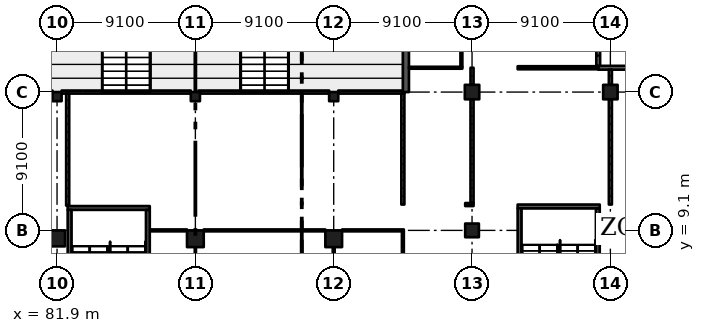
"""IFC4 building model, lengths in metres.
Left out: names, types, materials, properties, quantities, classifications, styles, units other than length and angle.
Written with IfcOpenShell. Run it as: python <this file> out.ifc"""

import sys

from ifc_helpers import new_model, si_unit, direction, frame, frame_2d, origin, origin_2d, place, context, subcontext, project, spatial, rectangle, extrude, element, fill, save


model = new_model("IFC4")
c1 = context("Model", 3, precision=1e-05, world=origin(), true_north=direction((0.0, 1.0)))
c2 = subcontext(c1, "Body", "Model", "MODEL_VIEW")
j1 = project(units=[si_unit("LENGTHUNIT", "METRE"), si_unit("PLANEANGLEUNIT", "RADIAN")], contexts=[c1])
p1 = place(None, origin())
s1 = spatial("IfcSite", under=j1, at=p1, CompositionType="ELEMENT")
p2 = place(p1, origin())
s2 = spatial("IfcBuilding", under=s1, at=p2, CompositionType="ELEMENT")
p3 = place(p2, origin())
s3 = spatial("IfcBuildingStorey", under=s2, at=p3, CompositionType="ELEMENT", Elevation=0.0)
p4 = place(p3, frame((81.9, 8.575, -0.4), z_axis=(0.0, 0.0, 1.0), x_axis=(1.0, 0.0, 0.0)))
e1 = element("IfcColumn", 1, at=p4, inside=s3, PredefinedType="COLUMN", context=c2, shape_type="SweptSolid", body=[
    extrude(rectangle(XDim=1.05, YDim=1.05, at=origin_2d()), origin(), (0.0, 0.0, 1.0), 6.77),
])
p5 = place(p3, frame((81.9, 17.9, -0.4), z_axis=(0.0, 0.0, 1.0), x_axis=(1.0, 0.0, 0.0)))
e2 = element("IfcColumn", 2, at=p5, inside=s3, PredefinedType="COLUMN", context=c2, shape_type="SweptSolid", body=[
    extrude(rectangle(XDim=0.6, YDim=0.6, at=origin_2d()), origin(), (0.0, 0.0, 1.0), 6.77),
])
p6 = place(p3, frame((91.0, 8.55, -0.4), z_axis=(0.0, 0.0, 1.0), x_axis=(1.0, 0.0, 0.0)))
e3 = element("IfcColumn", 3, at=p6, inside=s3, PredefinedType="COLUMN", context=c2, shape_type="SweptSolid", body=[
    extrude(rectangle(XDim=1.1, YDim=1.1, at=origin_2d()), origin(), (0.0, 0.0, 1.0), 6.77),
])
p7 = place(p3, frame((91.0, 17.9, -0.4), z_axis=(0.0, 0.0, 1.0), x_axis=(1.0, 0.0, 0.0)))
e4 = element("IfcColumn", 4, at=p7, inside=s3, PredefinedType="COLUMN", context=c2, shape_type="SweptSolid", body=[
    extrude(rectangle(XDim=0.6, YDim=0.6, at=origin_2d()), origin(), (0.0, 0.0, 1.0), 6.77),
])
p8 = place(p3, frame((100.1, 8.55, -0.4), z_axis=(0.0, 0.0, 1.0), x_axis=(1.0, 0.0, 0.0)))
e5 = element("IfcColumn", 5, at=p8, inside=s3, PredefinedType="COLUMN", context=c2, shape_type="SweptSolid", body=[
    extrude(rectangle(XDim=1.1, YDim=1.1, at=origin_2d()), origin(), (0.0, 0.0, 1.0), 6.77),
])
p9 = place(p3, frame((100.1, 17.9, -0.4), z_axis=(0.0, 0.0, 1.0), x_axis=(1.0, 0.0, 0.0)))
e6 = element("IfcColumn", 6, at=p9, inside=s3, PredefinedType="COLUMN", context=c2, shape_type="SweptSolid", body=[
    extrude(rectangle(XDim=0.6, YDim=0.6, at=origin_2d()), origin(), (0.0, 0.0, 1.0), 6.77),
])
p10 = place(p3, frame((109.2, 9.1, -0.4), z_axis=(0.0, 0.0, 1.0), x_axis=(1.0, 0.0, 0.0)))
e7 = element("IfcColumn", 7, at=p10, inside=s3, PredefinedType="COLUMN", context=c2, shape_type="SweptSolid", body=[
    extrude(rectangle(XDim=0.9, YDim=0.9, at=origin_2d()), origin(), (0.0, 0.0, 1.0), 6.77),
])
p11 = place(p3, frame((109.2, 18.2, -0.4), z_axis=(0.0, 0.0, 1.0), x_axis=(1.0, 0.0, 0.0)))
e8 = element("IfcColumn", 8, at=p11, inside=s3, PredefinedType="COLUMN", context=c2, shape_type="SweptSolid", body=[
    extrude(rectangle(XDim=0.95, YDim=0.95, at=origin_2d()), origin(), (0.0, 0.0, 1.0), 6.77),
])
p12 = place(p3, frame((118.3, 9.1, -0.4), z_axis=(0.0, 0.0, 1.0), x_axis=(1.0, 0.0, 0.0)))
e9 = element("IfcColumn", 9, at=p12, inside=s3, PredefinedType="COLUMN", context=c2, shape_type="SweptSolid", body=[
    extrude(rectangle(XDim=0.8, YDim=0.8, at=origin_2d()), origin(), (0.0, 0.0, 1.0), 6.77),
])
p13 = place(p3, frame((118.3, 18.2, -0.4), z_axis=(0.0, 0.0, 1.0), x_axis=(1.0, 0.0, 0.0)))
e10 = element("IfcColumn", 10, at=p13, inside=s3, PredefinedType="COLUMN", context=c2, shape_type="SweptSolid", body=[
    extrude(rectangle(XDim=0.95, YDim=0.95, at=origin_2d()), origin(), (0.0, 0.0, 1.0), 6.77),
])
p14 = place(p3, frame((104.85, 36.4, -0.4), z_axis=(0.0, 0.0, 1.0), x_axis=(0.0, -1.0, 0.0)))
e11 = element("IfcWall", 11, at=p14, inside=s3, PredefinedType="SHEAR", context=c2, shape_type="SweptSolid", body=[
    extrude(rectangle(XDim=18.2, YDim=0.4, at=frame_2d((9.1, 0.0))), origin(), (0.0, 0.0, 1.0), 6.77),
])
p15 = place(p3, frame((117.6, 10.675, -0.4), z_axis=(0.0, 0.0, 1.0), x_axis=(-1.0, 0.0, 0.0)))
e12 = element("IfcWall", 12, at=p15, inside=s3, PredefinedType="SHEAR", context=c2, shape_type="SweptSolid", body=[
    extrude(rectangle(XDim=5.4, YDim=0.25, at=frame_2d((2.7, 0.0))), origin(), (0.0, 0.0, 1.0), 6.77),
])
p16 = place(p15, frame((1.5, 0.0, 0.4)))
e13 = element("IfcOpeningElement", 13, at=p16, cuts=e12, PredefinedType="OPENING", context=c2, shape_type="SweptSolid", body=[
    extrude(rectangle(XDim=2.4, YDim=2.1, at=frame_2d((1.2, 1.05))), frame((0.0, 0.135, 0.0), z_axis=(0.0, -1.0, 0.0), x_axis=(1.0, 0.0, 0.0)), (0.0, 0.0, 1.0), 0.27),
])
p17 = place(p3, frame((112.325, 10.55, -0.4), z_axis=(0.0, 0.0, 1.0), x_axis=(0.0, -1.0, 0.0)))
e14 = element("IfcWall", 14, at=p17, inside=s3, PredefinedType="SHEAR", context=c2, shape_type="SweptSolid", body=[
    extrude(rectangle(XDim=9.6, YDim=0.25, at=frame_2d((4.8, 0.0))), origin(), (0.0, 0.0, 1.0), 6.77),
])
p18 = place(p17, frame((0.45, 0.0, 0.4)))
e15 = element("IfcOpeningElement", 15, at=p18, cuts=e14, PredefinedType="OPENING", context=c2, shape_type="SweptSolid", body=[
    extrude(rectangle(XDim=1.2, YDim=2.1, at=frame_2d((0.6, 1.05))), frame((0.0, 0.135, 0.0), z_axis=(0.0, -1.0, 0.0), x_axis=(1.0, 0.0, 0.0)), (0.0, 0.0, 1.0), 0.27),
])
p19 = place(p3, frame((117.475, 10.55, -0.4), z_axis=(0.0, 0.0, 1.0), x_axis=(0.0, -1.0, 0.0)))
e16 = element("IfcWall", 16, at=p19, inside=s3, PredefinedType="SHEAR", context=c2, shape_type="SweptSolid", body=[
    extrude(rectangle(XDim=9.6, YDim=0.25, at=frame_2d((4.8, 0.0))), origin(), (0.0, 0.0, 1.0), 6.77),
])
p20 = place(p3, frame((88.0, 10.575, -0.4), z_axis=(0.0, 0.0, 1.0), x_axis=(-1.0, 0.0, 0.0)))
e17 = element("IfcWall", 17, at=p20, inside=s3, PredefinedType="SHEAR", context=c2, shape_type="SweptSolid", body=[
    extrude(rectangle(XDim=5.4, YDim=0.25, at=frame_2d((2.7, 0.0))), origin(), (0.0, 0.0, 1.0), 6.77),
])
p21 = place(p20, frame((1.5, 0.0, 0.4)))
e18 = element("IfcOpeningElement", 18, at=p21, cuts=e17, PredefinedType="OPENING", context=c2, shape_type="SweptSolid", body=[
    extrude(rectangle(XDim=2.4, YDim=2.1, at=frame_2d((1.2, 1.05))), frame((0.0, 0.135, 0.0), z_axis=(0.0, -1.0, 0.0), x_axis=(1.0, 0.0, 0.0)), (0.0, 0.0, 1.0), 0.27),
])
for number, where, z_axis, x_axis in (
    (19, (82.725, 10.45, -0.4), (0.0, 0.0, 1.0), (0.0, -1.0, 0.0)),
    (20, (87.875, 10.45, -0.4), (0.0, 0.0, 1.0), (0.0, -1.0, 0.0)),
):
    element("IfcWall", number, at=place(p3, frame(where, z_axis=z_axis, x_axis=x_axis)), inside=s3, PredefinedType="SHEAR", context=c2, shape_type="SweptSolid", body=[
        extrude(rectangle(XDim=9.6, YDim=0.25, at=frame_2d((4.8, 0.0))), origin(), (0.0, 0.0, 1.0), 6.77),
    ])
p22 = place(p3, frame((82.2, 18.2, 0.0), z_axis=(0.0, 0.0, 1.0), x_axis=(1.0, 0.0, 0.0)))
e21 = element("IfcWall", 21, at=p22, inside=s3, PredefinedType="PARTITIONING", context=c2, shape_type="SweptSolid", body=[
    extrude(rectangle(XDim=8.5, YDim=0.2, at=frame_2d((4.25, 0.0))), origin(), (0.0, 0.0, 1.0), 5.02),
])
p23 = place(p3, frame((82.6, 18.1, 0.0), z_axis=(0.0, 0.0, 1.0), x_axis=(0.0, -1.0, 0.0)))
e22 = element("IfcWall", 22, at=p23, inside=s3, PredefinedType="PARTITIONING", context=c2, shape_type="SweptSolid", body=[
    extrude(rectangle(XDim=7.37, YDim=0.2, at=frame_2d((3.685, 0.0))), origin(), (0.0, 0.0, 1.0), 6.02),
])
p24 = place(p23, frame((2.15, 0.0, 0.0)))
e23 = element("IfcOpeningElement", 23, at=p24, cuts=e22, PredefinedType="OPENING", context=c2, shape_type="SweptSolid", body=[
    extrude(rectangle(XDim=3.0, YDim=2.4, at=frame_2d((1.5, 1.2))), frame((0.0, 0.11, 0.0), z_axis=(0.0, -1.0, 0.0), x_axis=(1.0, 0.0, 0.0)), (0.0, 0.0, 1.0), 0.22),
])
p25 = place(p3, frame((90.45, 9.1, 0.0), z_axis=(0.0, 0.0, 1.0), x_axis=(-1.0, 0.0, 0.0)))
e24 = element("IfcWall", 24, at=p25, inside=s3, PredefinedType="PARTITIONING", context=c2, shape_type="SweptSolid", body=[
    extrude(rectangle(XDim=2.42, YDim=0.125, at=frame_2d((1.21, 0.0))), origin(), (0.0, 0.0, 1.0), 5.57),
])
p26 = place(p3, frame((91.2, 18.2, 0.0), z_axis=(0.0, 0.0, 1.0), x_axis=(1.0, 0.0, 0.0)))
e25 = element("IfcWall", 25, at=p26, inside=s3, PredefinedType="PARTITIONING", context=c2, shape_type="SweptSolid", body=[
    extrude(rectangle(XDim=8.6, YDim=0.2, at=frame_2d((4.3, 0.0))), origin(), (0.0, 0.0, 1.0), 5.02),
])
p27 = place(p3, frame((99.55, 9.1, 0.0), z_axis=(0.0, 0.0, 1.0), x_axis=(-1.0, 0.0, 0.0)))
e26 = element("IfcWall", 26, at=p27, inside=s3, PredefinedType="PARTITIONING", context=c2, shape_type="SweptSolid", body=[
    extrude(rectangle(XDim=8.0, YDim=0.125, at=frame_2d((4.0, 0.0))), origin(), (0.0, 0.0, 1.0), 5.32),
])
p28 = place(p27, frame((3.55, 0.0, 0.0)))
e27 = element("IfcOpeningElement", 27, at=p28, cuts=e26, PredefinedType="OPENING", context=c2, shape_type="SweptSolid", body=[
    extrude(rectangle(XDim=0.9, YDim=2.1, at=frame_2d((0.45, 1.05))), frame((0.0, 0.073, 0.0), z_axis=(0.0, -1.0, 0.0), x_axis=(1.0, 0.0, 0.0)), (0.0, 0.0, 1.0), 0.145),
])
p29 = place(p3, frame((100.1, 8.0, 0.0), z_axis=(0.0, 0.0, 1.0), x_axis=(0.0, -1.0, 0.0)))
e28 = element("IfcWall", 28, at=p29, inside=s3, PredefinedType="PARTITIONING", context=c2, shape_type="SweptSolid", body=[
    extrude(rectangle(XDim=7.65, YDim=0.125, at=frame_2d((3.825, 0.0))), origin(), (0.0, 0.0, 1.0), 5.37),
])
p30 = place(p3, frame((100.4, 18.2, 0.0), z_axis=(0.0, 0.0, 1.0), x_axis=(1.0, 0.0, 0.0)))
e29 = element("IfcWall", 29, at=p30, inside=s3, PredefinedType="PARTITIONING", context=c2, shape_type="SweptSolid", body=[
    extrude(rectangle(XDim=4.35, YDim=0.2, at=frame_2d((2.175, 0.0))), origin(), (0.0, 0.0, 1.0), 5.02),
])
p31 = place(p3, frame((104.65, 0.15, 0.0), z_axis=(0.0, 0.0, 1.0), x_axis=(0.0, 1.0, 0.0)))
e30 = element("IfcWall", 30, at=p31, inside=s3, PredefinedType="PARTITIONING", context=c2, shape_type="SweptSolid", body=[
    extrude(rectangle(XDim=8.888, YDim=0.125, at=frame_2d((4.444, 0.0))), origin(), (0.0, 0.0, 1.0), 6.02),
])
p32 = place(p3, frame((104.65, 10.8, 0.0), z_axis=(0.0, 0.0, 1.0), x_axis=(0.0, 1.0, 0.0)))
e31 = element("IfcWall", 31, at=p32, inside=s3, PredefinedType="PARTITIONING", context=c2, shape_type="SweptSolid", body=[
    extrude(rectangle(XDim=7.3, YDim=0.2, at=frame_2d((3.65, 0.0))), origin(), (0.0, 0.0, 1.0), 6.02),
])
p33 = place(p32, frame((0.95, 0.0, 0.0)))
e32 = element("IfcOpeningElement", 32, at=p33, cuts=e31, PredefinedType="OPENING", context=c2, shape_type="SweptSolid", body=[
    extrude(rectangle(XDim=1.8, YDim=2.4, at=frame_2d((0.9, 1.2))), frame((0.0, 0.11, 0.0), z_axis=(0.0, -1.0, 0.0), x_axis=(1.0, 0.0, 0.0)), (0.0, 0.0, 1.0), 0.22),
])
p34 = place(p32, frame((4.55, 0.0, 0.0)))
e33 = element("IfcOpeningElement", 33, at=p34, cuts=e31, PredefinedType="OPENING", context=c2, shape_type="SweptSolid", body=[
    extrude(rectangle(XDim=1.8, YDim=2.4, at=frame_2d((0.9, 1.2))), frame((0.0, 0.11, 0.0), z_axis=(0.0, -1.0, 0.0), x_axis=(1.0, 0.0, 0.0)), (0.0, 0.0, 1.0), 0.22),
])
p35 = place(p3, frame((104.712, 9.1, 0.0), z_axis=(0.0, 0.0, 1.0), x_axis=(-1.0, 0.0, 0.0)))
e34 = element("IfcWall", 34, at=p35, inside=s3, PredefinedType="PARTITIONING", context=c2, shape_type="SweptSolid", body=[
    extrude(rectangle(XDim=4.062, YDim=0.125, at=frame_2d((2.031, 0.0))), origin(), (0.0, 0.0, 1.0), 5.32),
])
p36 = place(p35, frame((1.55, 0.0, 0.0)))
e35 = element("IfcOpeningElement", 35, at=p36, cuts=e34, PredefinedType="OPENING", context=c2, shape_type="SweptSolid", body=[
    extrude(rectangle(XDim=1.0, YDim=2.1, at=frame_2d((0.5, 1.05))), frame((0.0, 0.073, 0.0), z_axis=(0.0, -1.0, 0.0), x_axis=(1.0, 0.0, 0.0)), (0.0, 0.0, 1.0), 0.145),
])
p37 = place(p3, frame((105.05, 19.8, 0.0), z_axis=(0.0, 0.0, 1.0), x_axis=(1.0, 0.0, 0.0)))
e36 = element("IfcWall", 36, at=p37, inside=s3, PredefinedType="PARTITIONING", context=c2, shape_type="SweptSolid", body=[
    extrude(rectangle(XDim=3.512, YDim=0.125, at=frame_2d((1.756, 0.0))), origin(), (0.0, 0.0, 1.0), 6.02),
])
p38 = place(p37, frame((1.35, 0.0, 0.0)))
e37 = element("IfcOpeningElement", 37, at=p38, cuts=e36, PredefinedType="OPENING", context=c2, shape_type="SweptSolid", body=[
    extrude(rectangle(XDim=0.9, YDim=2.1, at=frame_2d((0.45, 1.05))), frame((0.0, 0.073, 0.0), z_axis=(0.0, -1.0, 0.0), x_axis=(1.0, 0.0, 0.0)), (0.0, 0.0, 1.0), 0.145),
])
p39 = place(p3, frame((108.5, 19.863, 0.0), z_axis=(0.0, 0.0, 1.0), x_axis=(0.0, 1.0, 0.0)))
e38 = element("IfcWall", 38, at=p39, inside=s3, PredefinedType="PARTITIONING", context=c2, shape_type="SweptSolid", body=[
    extrude(rectangle(XDim=7.012, YDim=0.125, at=frame_2d((3.506, 0.0))), origin(), (0.0, 0.0, 1.0), 6.02),
])
p40 = place(p3, frame((108.75, 10.8, 0.0), z_axis=(0.0, 0.0, 1.0), x_axis=(1.0, 0.0, 0.0)))
e39 = element("IfcWall", 39, at=p40, inside=s3, PredefinedType="PARTITIONING", context=c2, shape_type="SweptSolid", body=[
    extrude(rectangle(XDim=0.55, YDim=0.2, at=frame_2d((0.275, 0.0))), origin(), (0.0, 0.0, 1.0), 6.02),
])
p41 = place(p3, frame((109.2, 10.9, 0.0), z_axis=(0.0, 0.0, 1.0), x_axis=(0.0, 1.0, 0.0)))
e40 = element("IfcWall", 40, at=p41, inside=s3, PredefinedType="PARTITIONING", context=c2, shape_type="SweptSolid", body=[
    extrude(rectangle(XDim=6.825, YDim=0.2, at=frame_2d((3.413, 0.0))), origin(), (0.0, 0.0, 1.0), 5.32),
])
p42 = place(p41, frame((0.85, 0.0, 0.0)))
e41 = element("IfcOpeningElement", 41, at=p42, cuts=e40, PredefinedType="OPENING", context=c2, shape_type="SweptSolid", body=[
    extrude(rectangle(XDim=1.8, YDim=2.4, at=frame_2d((0.9, 1.2))), frame((0.0, 0.11, 0.0), z_axis=(0.0, -1.0, 0.0), x_axis=(1.0, 0.0, 0.0)), (0.0, 0.0, 1.0), 0.22),
])
p43 = place(p41, frame((4.25, 0.0, 0.0)))
e42 = element("IfcOpeningElement", 42, at=p43, cuts=e40, PredefinedType="OPENING", context=c2, shape_type="SweptSolid", body=[
    extrude(rectangle(XDim=1.8, YDim=2.4, at=frame_2d((0.9, 1.2))), frame((0.0, 0.11, 0.0), z_axis=(0.0, -1.0, 0.0), x_axis=(1.0, 0.0, 0.0)), (0.0, 0.0, 1.0), 0.22),
])
p44 = place(p3, frame((109.2, 18.675, 0.0), z_axis=(0.0, 0.0, 1.0), x_axis=(0.0, 1.0, 0.0)))
e43 = element("IfcWall", 43, at=p44, inside=s3, PredefinedType="PARTITIONING", context=c2, shape_type="SweptSolid", body=[
    extrude(rectangle(XDim=1.125, YDim=0.2, at=frame_2d((0.562, 0.0))), origin(), (0.0, 0.0, 1.0), 5.32),
])
p45 = place(p3, frame((112.2, 19.8, 0.0), z_axis=(0.0, 0.0, 1.0), x_axis=(1.0, 0.0, 0.0)))
e44 = element("IfcWall", 44, at=p45, inside=s3, PredefinedType="PARTITIONING", context=c2, shape_type="SweptSolid", body=[
    extrude(rectangle(XDim=5.3, YDim=0.2, at=frame_2d((2.65, 0.0))), origin(), (0.0, 0.0, 1.0), 6.02),
])
p46 = place(p45, frame((1.75, 0.0, 0.0)))
e45 = element("IfcOpeningElement", 45, at=p46, cuts=e44, PredefinedType="OPENING", context=c2, shape_type="SweptSolid", body=[
    extrude(rectangle(XDim=1.8, YDim=2.4, at=frame_2d((0.9, 1.2))), frame((0.0, 0.11, 0.0), z_axis=(0.0, -1.0, 0.0), x_axis=(1.0, 0.0, 0.0)), (0.0, 0.0, 1.0), 0.22),
])
p47 = place(p3, frame((117.5, 19.8, 0.0), z_axis=(0.0, 0.0, 1.0), x_axis=(1.0, 0.0, 0.0)))
e46 = element("IfcWall", 46, at=p47, inside=s3, PredefinedType="SOLIDWALL", context=c2, shape_type="SweptSolid", body=[
    extrude(rectangle(XDim=3.8, YDim=0.25, at=frame_2d((1.9, 0.0))), origin(), (0.0, 0.0, 1.0), 6.02),
])
p48 = place(p47, frame((1.85, 0.0, 0.0)))
e47 = element("IfcOpeningElement", 47, at=p48, cuts=e46, PredefinedType="OPENING", context=c2, shape_type="SweptSolid", body=[
    extrude(rectangle(XDim=1.0, YDim=2.1, at=frame_2d((0.5, 1.05))), frame((0.0, 0.135, 0.0), z_axis=(0.0, -1.0, 0.0), x_axis=(1.0, 0.0, 0.0)), (0.0, 0.0, 1.0), 0.27),
])
p49 = place(p3, frame((117.5, 19.925, 0.0), z_axis=(0.0, 0.0, 1.0), x_axis=(0.0, 1.0, 0.0)))
e48 = element("IfcWall", 48, at=p49, inside=s3, PredefinedType="SOLIDWALL", context=c2, shape_type="SweptSolid", body=[
    extrude(rectangle(XDim=2.845, YDim=0.25, at=frame_2d((1.422, 0.0))), origin(), (0.0, 0.0, 1.0), 6.02),
])
p50 = place(p3, frame((118.3, 10.8, 0.0), z_axis=(0.0, 0.0, 1.0), x_axis=(0.0, 1.0, 0.0)))
e49 = element("IfcWall", 49, at=p50, inside=s3, PredefinedType="PARTITIONING", context=c2, shape_type="SweptSolid", body=[
    extrude(rectangle(XDim=6.925, YDim=0.2, at=frame_2d((3.462, 0.0))), origin(), (0.0, 0.0, 1.0), 5.32),
])
p51 = place(p50, frame((0.85, 0.0, 0.0)))
e50 = element("IfcOpeningElement", 50, at=p51, cuts=e49, PredefinedType="OPENING", context=c2, shape_type="SweptSolid", body=[
    extrude(rectangle(XDim=1.8, YDim=2.4, at=frame_2d((0.9, 1.2))), frame((0.0, 0.11, 0.0), z_axis=(0.0, -1.0, 0.0), x_axis=(1.0, 0.0, 0.0)), (0.0, 0.0, 1.0), 0.22),
])
p52 = place(p50, frame((4.25, 0.0, 0.0)))
e51 = element("IfcOpeningElement", 51, at=p52, cuts=e49, PredefinedType="OPENING", context=c2, shape_type="SweptSolid", body=[
    extrude(rectangle(XDim=1.8, YDim=2.4, at=frame_2d((0.9, 1.2))), frame((0.0, 0.11, 0.0), z_axis=(0.0, -1.0, 0.0), x_axis=(1.0, 0.0, 0.0)), (0.0, 0.0, 1.0), 0.22),
])
p53 = place(p3, frame((118.3, 18.675, 0.0), z_axis=(0.0, 0.0, 1.0), x_axis=(0.0, 1.0, 0.0)))
e52 = element("IfcWall", 52, at=p53, inside=s3, PredefinedType="PARTITIONING", context=c2, shape_type="SweptSolid", body=[
    extrude(rectangle(XDim=1.0, YDim=0.2, at=frame_2d((0.5, 0.0))), origin(), (0.0, 0.0, 1.0), 5.32),
])
p54 = place(p38, origin())
e53 = element("IfcDoor", 53, at=p54, inside=s3, OperationType="SINGLE_SWING_LEFT", PredefinedType="DOOR", context=c2, shape_type="SweptSolid", body=[
    extrude(rectangle(XDim=0.9, YDim=2.1, at=frame_2d((0.45, 1.05))), frame((0.0, 0.025, 0.0), z_axis=(0.0, -1.0, 0.0), x_axis=(1.0, 0.0, 0.0)), (0.0, 0.0, 1.0), 0.05),
])
fill(e37, e53)
p55 = place(p28, origin())
e54 = element("IfcDoor", 54, at=p55, inside=s3, OperationType="SINGLE_SWING_RIGHT", PredefinedType="DOOR", context=c2, shape_type="SweptSolid", body=[
    extrude(rectangle(XDim=0.9, YDim=2.1, at=frame_2d((0.45, 1.05))), frame((0.0, 0.025, 0.0), z_axis=(0.0, -1.0, 0.0), x_axis=(1.0, 0.0, 0.0)), (0.0, 0.0, 1.0), 0.05),
])
fill(e27, e54)
p56 = place(p36, origin())
e55 = element("IfcDoor", 55, at=p56, inside=s3, OperationType="SINGLE_SWING_LEFT", PredefinedType="DOOR", context=c2, shape_type="SweptSolid", body=[
    extrude(rectangle(XDim=1.0, YDim=2.1, at=frame_2d((0.5, 1.05))), frame((0.0, 0.025, 0.0), z_axis=(0.0, -1.0, 0.0), x_axis=(1.0, 0.0, 0.0)), (0.0, 0.0, 1.0), 0.05),
])
fill(e35, e55)
p57 = place(p51, origin())
e56 = element("IfcDoor", 56, at=p57, inside=s3, OperationType="DOUBLE_DOOR_SINGLE_SWING", PredefinedType="DOOR", context=c2, shape_type="SweptSolid", body=[
    extrude(rectangle(XDim=1.8, YDim=2.4, at=frame_2d((0.9, 1.2))), frame((0.0, 0.025, 0.0), z_axis=(0.0, -1.0, 0.0), x_axis=(1.0, 0.0, 0.0)), (0.0, 0.0, 1.0), 0.05),
])
fill(e50, e56)
p58 = place(p52, origin())
e57 = element("IfcDoor", 57, at=p58, inside=s3, OperationType="DOUBLE_DOOR_SINGLE_SWING", PredefinedType="DOOR", context=c2, shape_type="SweptSolid", body=[
    extrude(rectangle(XDim=1.8, YDim=2.4, at=frame_2d((0.9, 1.2))), frame((0.0, 0.025, 0.0), z_axis=(0.0, -1.0, 0.0), x_axis=(1.0, 0.0, 0.0)), (0.0, 0.0, 1.0), 0.05),
])
fill(e51, e57)
p59 = place(p42, origin())
e58 = element("IfcDoor", 58, at=p59, inside=s3, OperationType="DOUBLE_DOOR_SINGLE_SWING", PredefinedType="DOOR", context=c2, shape_type="SweptSolid", body=[
    extrude(rectangle(XDim=1.8, YDim=2.4, at=frame_2d((0.9, 1.2))), frame((0.0, 0.025, 0.0), z_axis=(0.0, -1.0, 0.0), x_axis=(1.0, 0.0, 0.0)), (0.0, 0.0, 1.0), 0.05),
])
fill(e41, e58)
p60 = place(p43, origin())
e59 = element("IfcDoor", 59, at=p60, inside=s3, OperationType="DOUBLE_DOOR_SINGLE_SWING", PredefinedType="DOOR", context=c2, shape_type="SweptSolid", body=[
    extrude(rectangle(XDim=1.8, YDim=2.4, at=frame_2d((0.9, 1.2))), frame((0.0, 0.025, 0.0), z_axis=(0.0, -1.0, 0.0), x_axis=(1.0, 0.0, 0.0)), (0.0, 0.0, 1.0), 0.05),
])
fill(e42, e59)
p61 = place(p46, origin())
e60 = element("IfcDoor", 60, at=p61, inside=s3, OperationType="DOUBLE_DOOR_SINGLE_SWING", PredefinedType="DOOR", context=c2, shape_type="SweptSolid", body=[
    extrude(rectangle(XDim=1.8, YDim=2.4, at=frame_2d((0.9, 1.2))), frame((0.0, 0.025, 0.0), z_axis=(0.0, -1.0, 0.0), x_axis=(1.0, 0.0, 0.0)), (0.0, 0.0, 1.0), 0.05),
])
fill(e45, e60)
p62 = place(p33, origin())
e61 = element("IfcDoor", 61, at=p62, inside=s3, OperationType="DOUBLE_DOOR_SINGLE_SWING", PredefinedType="DOOR", context=c2, shape_type="SweptSolid", body=[
    extrude(rectangle(XDim=1.8, YDim=2.4, at=frame_2d((0.9, 1.2))), frame((0.0, 0.025, 0.0), z_axis=(0.0, -1.0, 0.0), x_axis=(1.0, 0.0, 0.0)), (0.0, 0.0, 1.0), 0.05),
])
fill(e32, e61)
p63 = place(p34, origin())
e62 = element("IfcDoor", 62, at=p63, inside=s3, OperationType="DOUBLE_DOOR_SINGLE_SWING", PredefinedType="DOOR", context=c2, shape_type="SweptSolid", body=[
    extrude(rectangle(XDim=1.8, YDim=2.4, at=frame_2d((0.9, 1.2))), frame((0.0, 0.025, 0.0), z_axis=(0.0, -1.0, 0.0), x_axis=(1.0, 0.0, 0.0)), (0.0, 0.0, 1.0), 0.05),
])
fill(e33, e62)
p64 = place(p24, origin())
e63 = element("IfcDoor", 63, at=p64, inside=s3, OperationType="DOUBLE_DOOR_SINGLE_SWING", PredefinedType="DOOR", context=c2, shape_type="SweptSolid", body=[
    extrude(rectangle(XDim=3.0, YDim=2.4, at=frame_2d((1.5, 1.2))), frame((0.0, 0.025, 0.0), z_axis=(0.0, -1.0, 0.0), x_axis=(1.0, 0.0, 0.0)), (0.0, 0.0, 1.0), 0.05),
])
fill(e23, e63)
p65 = place(p16, origin())
e64 = element("IfcDoor", 64, at=p65, inside=s3, OperationType="DOUBLE_DOOR_SINGLE_SWING", PredefinedType="DOOR", context=c2, shape_type="SweptSolid", body=[
    extrude(rectangle(XDim=2.4, YDim=2.1, at=frame_2d((1.2, 1.05))), frame((0.0, 0.025, 0.0), z_axis=(0.0, -1.0, 0.0), x_axis=(1.0, 0.0, 0.0)), (0.0, 0.0, 1.0), 0.05),
])
fill(e13, e64)
p66 = place(p21, origin())
e65 = element("IfcDoor", 65, at=p66, inside=s3, OperationType="DOUBLE_DOOR_SINGLE_SWING", PredefinedType="DOOR", context=c2, shape_type="SweptSolid", body=[
    extrude(rectangle(XDim=2.4, YDim=2.1, at=frame_2d((1.2, 1.05))), frame((0.0, 0.025, 0.0), z_axis=(0.0, -1.0, 0.0), x_axis=(1.0, 0.0, 0.0)), (0.0, 0.0, 1.0), 0.05),
])
fill(e18, e65)
p67 = place(p18, origin())
e66 = element("IfcDoor", 66, at=p67, inside=s3, OperationType="SINGLE_SWING_LEFT", PredefinedType="DOOR", context=c2, shape_type="SweptSolid", body=[
    extrude(rectangle(XDim=1.2, YDim=2.1, at=frame_2d((0.6, 1.05))), frame((0.0, 0.025, 0.0), z_axis=(0.0, -1.0, 0.0), x_axis=(1.0, 0.0, 0.0)), (0.0, 0.0, 1.0), 0.05),
])
fill(e15, e66)
save(model, sys.argv[1])
